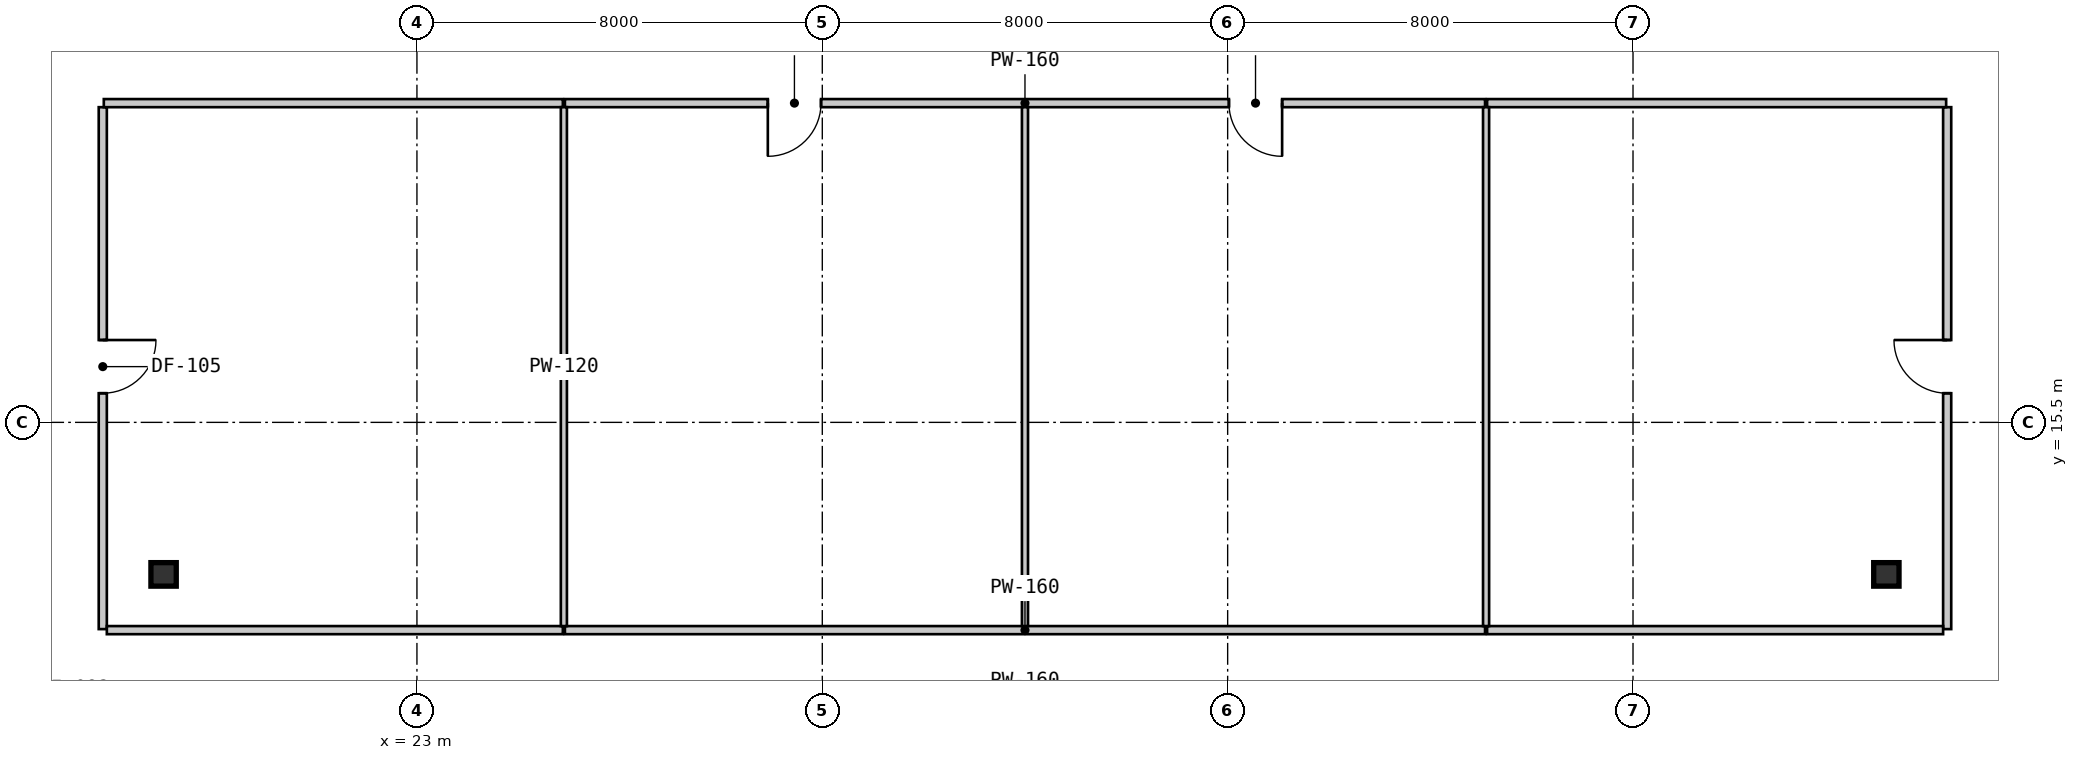
"""IFC4 building model, lengths in metres.
Left out: names, types, materials, properties, quantities, classifications, styles, units other than length and angle.
Written with IfcOpenShell. Run it as: python <this file> out.ifc"""

import sys

from ifc_helpers import new_model, si_unit, direction, frame, frame_2d, origin, origin_2d, place, context, subcontext, project, spatial, rectangle, i_section, extrude, source, transform, mapped, element, fill, save


model = new_model("IFC4")
c1 = context("Model", 3, precision=1e-05, world=origin(), true_north=direction((0.0, 1.0)))
c2 = subcontext(c1, "Body", "Model", "MODEL_VIEW")
j1 = project(units=[si_unit("LENGTHUNIT", "METRE"), si_unit("PLANEANGLEUNIT", "RADIAN")], contexts=[c1])
p1 = place(None, origin())
s1 = spatial("IfcSite", under=j1, at=p1, CompositionType="ELEMENT")
p2 = place(p1, origin())
s2 = spatial("IfcBuilding", under=s1, at=p2, CompositionType="ELEMENT")
p3 = place(p2, frame((0.0, 0.0, 68.25)))
s3 = spatial("IfcBuildingStorey", under=s2, at=p3, CompositionType="ELEMENT", Elevation=68.25)
m1 = source(origin(), c2, "Body", "SweptSolid", [
    extrude(i_section(OverallWidth=0.5, OverallDepth=0.464, WebThickness=0.022, FlangeThickness=0.034, at=origin_2d()), origin(), (0.0, 0.0, 1.0), 3.15),
])
for number, where, z_axis, x_axis in (
    (1, (18.0, 12.5, 0.0), (0.0, 0.0, 1.0), (1.0, 0.0, 0.0)),
    (2, (52.0, 12.5, 0.0), (0.0, 0.0, 1.0), (1.0, 0.0, 0.0)),
):
    element("IfcColumn", number, at=place(p3, frame(where, z_axis=z_axis, x_axis=x_axis)), inside=s3, PredefinedType="COLUMN", context=c2, shape_type="MappedRepresentation", body=[
        mapped(m1, transform((0.0, 0.0, 0.0), scale=1.0)),
    ])
m2 = source(origin(), c2, "Body", "SweptSolid", [
    extrude(rectangle(XDim=10.3, YDim=0.16, at=frame_2d((5.15, 0.0))), origin(), (0.0, 0.0, 1.0), 2.93),
])
p4 = place(p3, frame((16.8, 21.72, 0.0), z_axis=(0.0, 0.0, 1.0), x_axis=(0.0, -1.0, 0.0)))
e3 = element("IfcWall", 3, at=p4, inside=s3, PredefinedType="PARTITIONING", context=c2, shape_type="MappedRepresentation", body=[
    mapped(m2, transform((0.0, 0.0, 0.0), scale=1.0)),
])
m3 = source(origin(), c2, "Body", "SweptSolid", [
    extrude(rectangle(XDim=1.05, YDim=2.1, at=frame_2d((0.525, 1.05))), frame((0.0, 0.09, 0.0), z_axis=(0.0, -1.0, 0.0), x_axis=(1.0, 0.0, 0.0)), (0.0, 0.0, 1.0), 0.18),
])
p5 = place(p4, frame((4.595, 0.0, 0.0)))
e4 = element("IfcOpeningElement", 4, at=p5, cuts=e3, PredefinedType="OPENING", context=c2, shape_type="MappedRepresentation", body=[
    mapped(m3, transform((0.0, 0.0, 0.0), scale=1.0)),
])
m4 = source(origin(), c2, "Body", "SweptSolid", [
    extrude(rectangle(XDim=9.06, YDim=0.16, at=frame_2d((4.53, 0.0))), origin(), (0.0, 0.0, 1.0), 2.93),
])
p6 = place(p3, frame((25.88, 21.8, 0.0), z_axis=(0.0, 0.0, 1.0), x_axis=(-1.0, 0.0, 0.0)))
e5 = element("IfcWall", 5, at=p6, inside=s3, PredefinedType="PARTITIONING", context=c2, shape_type="MappedRepresentation", body=[
    mapped(m4, transform((0.0, 0.0, 0.0), scale=1.0)),
])
p7 = place(p3, frame((34.98, 21.8, 0.0), z_axis=(0.0, 0.0, 1.0), x_axis=(-1.0, 0.0, 0.0)))
e6 = element("IfcWall", 6, at=p7, inside=s3, PredefinedType="PARTITIONING", context=c2, shape_type="MappedRepresentation", body=[
    mapped(m4, transform((0.0, 0.0, 0.0), scale=1.0)),
])
p8 = place(p7, frame((4.005, 0.0, 0.0)))
e7 = element("IfcOpeningElement", 7, at=p8, cuts=e6, PredefinedType="OPENING", context=c2, shape_type="MappedRepresentation", body=[
    mapped(m3, transform((0.0, 0.0, 0.0), scale=1.0)),
])
p9 = place(p3, frame((44.08, 21.8, 0.0), z_axis=(0.0, 0.0, 1.0), x_axis=(-1.0, 0.0, 0.0)))
e8 = element("IfcWall", 8, at=p9, inside=s3, PredefinedType="PARTITIONING", context=c2, shape_type="MappedRepresentation", body=[
    mapped(m4, transform((0.0, 0.0, 0.0), scale=1.0)),
])
p10 = place(p9, frame((4.005, 0.0, 0.0)))
e9 = element("IfcOpeningElement", 9, at=p10, cuts=e8, PredefinedType="OPENING", context=c2, shape_type="MappedRepresentation", body=[
    mapped(m3, transform((0.0, 0.0, 0.0), scale=1.0)),
])
p11 = place(p3, frame((53.2, 11.42, 0.0), z_axis=(0.0, 0.0, 1.0), x_axis=(0.0, 1.0, 0.0)))
e10 = element("IfcWall", 10, at=p11, inside=s3, PredefinedType="PARTITIONING", context=c2, shape_type="MappedRepresentation", body=[
    mapped(m2, transform((0.0, 0.0, 0.0), scale=1.0)),
])
p12 = place(p11, frame((4.655, 0.0, 0.0)))
e11 = element("IfcOpeningElement", 11, at=p12, cuts=e10, PredefinedType="OPENING", context=c2, shape_type="MappedRepresentation", body=[
    mapped(m3, transform((0.0, 0.0, 0.0), scale=1.0)),
])
p13 = place(p3, frame((53.18, 21.8, 0.0), z_axis=(0.0, 0.0, 1.0), x_axis=(-1.0, 0.0, 0.0)))
e12 = element("IfcWall", 12, at=p13, inside=s3, PredefinedType="PARTITIONING", context=c2, shape_type="MappedRepresentation", body=[
    mapped(m4, transform((0.0, 0.0, 0.0), scale=1.0)),
])
m5 = source(origin(), c2, "Body", "SweptSolid", [
    extrude(rectangle(XDim=9.0, YDim=0.16, at=frame_2d((4.5, 0.0))), origin(), (0.0, 0.0, 1.0), 2.93),
])
p14 = place(p3, frame((16.88, 11.4, 0.0), z_axis=(0.0, 0.0, 1.0), x_axis=(1.0, 0.0, 0.0)))
e13 = element("IfcWall", 13, at=p14, inside=s3, PredefinedType="PARTITIONING", context=c2, shape_type="MappedRepresentation", body=[
    mapped(m5, transform((0.0, 0.0, 0.0), scale=1.0)),
])
for number, where, z_axis, x_axis in (
    (14, (25.92, 11.4, 0.0), (0.0, 0.0, 1.0), (1.0, 0.0, 0.0)),
    (15, (35.02, 11.4, 0.0), (0.0, 0.0, 1.0), (1.0, 0.0, 0.0)),
):
    element("IfcWall", number, at=place(p3, frame(where, z_axis=z_axis, x_axis=x_axis)), inside=s3, PredefinedType="PARTITIONING", context=c2, shape_type="MappedRepresentation", body=[
        mapped(m4, transform((0.0, 0.0, 0.0), scale=1.0)),
    ])
p15 = place(p3, frame((44.12, 11.4, 0.0), z_axis=(0.0, 0.0, 1.0), x_axis=(1.0, 0.0, 0.0)))
e16 = element("IfcWall", 16, at=p15, inside=s3, PredefinedType="PARTITIONING", context=c2, shape_type="MappedRepresentation", body=[
    mapped(m5, transform((0.0, 0.0, 0.0), scale=1.0)),
])
m6 = source(origin(), c2, "Body", "SweptSolid", [
    extrude(rectangle(XDim=10.24, YDim=0.12, at=frame_2d((5.12, 0.0))), origin(), (0.0, 0.0, 1.0), 2.93),
])
for number, where, z_axis, x_axis in (
    (17, (25.9, 21.72, 0.0), (0.0, 0.0, 1.0), (0.0, -1.0, 0.0)),
    (18, (35.0, 21.72, 0.0), (0.0, 0.0, 1.0), (0.0, -1.0, 0.0)),
    (19, (44.1, 21.72, 0.0), (0.0, 0.0, 1.0), (0.0, -1.0, 0.0)),
):
    element("IfcWall", number, at=place(p3, frame(where, z_axis=z_axis, x_axis=x_axis)), inside=s3, PredefinedType="PARTITIONING", context=c2, shape_type="MappedRepresentation", body=[
        mapped(m6, transform((0.0, 0.0, 0.0), scale=1.0)),
    ])
m7 = source(origin(), c2, "Body", "SweptSolid", [
    extrude(rectangle(XDim=1.05, YDim=2.1, at=frame_2d((0.525, 1.05))), frame((0.0, 0.025, 0.0), z_axis=(0.0, -1.0, 0.0), x_axis=(1.0, 0.0, 0.0)), (0.0, 0.0, 1.0), 0.05),
])
p16 = place(p5, origin())
e20 = element("IfcDoor", 20, at=p16, inside=s3, OperationType="SINGLE_SWING_LEFT", PredefinedType="DOOR", context=c2, shape_type="MappedRepresentation", body=[
    mapped(m7, transform((0.0, 0.0, 0.0), scale=1.0)),
])
fill(e4, e20)
p17 = place(p8, origin())
e21 = element("IfcDoor", 21, at=p17, inside=s3, OperationType="SINGLE_SWING_RIGHT", PredefinedType="DOOR", context=c2, shape_type="MappedRepresentation", body=[
    mapped(m7, transform((0.0, 0.0, 0.0), scale=1.0)),
])
fill(e7, e21)
p18 = place(p10, origin())
e22 = element("IfcDoor", 22, at=p18, inside=s3, OperationType="SINGLE_SWING_LEFT", PredefinedType="DOOR", context=c2, shape_type="MappedRepresentation", body=[
    mapped(m7, transform((0.0, 0.0, 0.0), scale=1.0)),
])
fill(e9, e22)
p19 = place(p12, origin())
e23 = element("IfcDoor", 23, at=p19, inside=s3, OperationType="SINGLE_SWING_RIGHT", PredefinedType="DOOR", context=c2, shape_type="MappedRepresentation", body=[
    mapped(m7, transform((0.0, 0.0, 0.0), scale=1.0)),
])
fill(e11, e23)
save(model, sys.argv[1])
